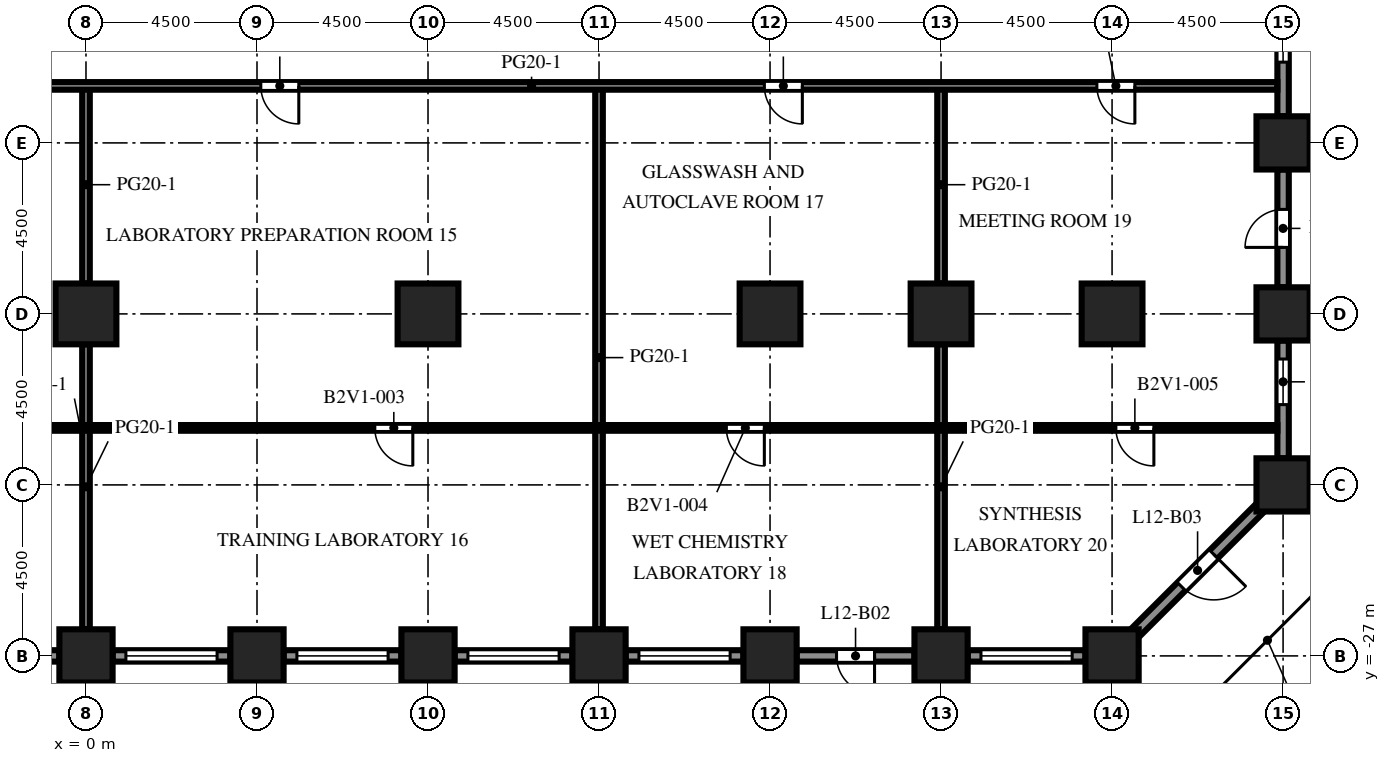
"""IFC4 building model, lengths in metres.
Left out: names, types, materials, properties, quantities, classifications, styles, units other than length and angle.
Written with IfcOpenShell. Run it as: python <this file> out.ifc"""

import sys

from ifc_helpers import new_model, si_unit, direction, frame, frame_2d, origin, origin_2d, place, context, subcontext, project, spatial, rectangle, extrude, element, fill, save


model = new_model("IFC4")
c1 = context("Model", 3, precision=1e-05, world=origin(), true_north=direction((0.0, 1.0)))
c2 = subcontext(c1, "Body", "Model", "MODEL_VIEW")
j1 = project(units=[si_unit("LENGTHUNIT", "METRE"), si_unit("PLANEANGLEUNIT", "RADIAN")], contexts=[c1])
p1 = place(None, origin())
s1 = spatial("IfcSite", under=j1, at=p1, CompositionType="ELEMENT")
p2 = place(p1, origin())
s2 = spatial("IfcBuilding", under=s1, at=p2, CompositionType="ELEMENT")
p3 = place(p2, frame((0.0, 0.0, 54.2)))
s3 = spatial("IfcBuildingStorey", under=s2, at=p3, CompositionType="ELEMENT", Elevation=54.2)
for number, where, z_axis, x_axis in (
    (1, (0.0, -27.0, 0.0), (0.0, 0.0, 1.0), (1.0, 0.0, 0.0)),
    (2, (4.5, -27.0, 0.0), (0.0, 0.0, 1.0), (1.0, 0.0, 0.0)),
    (3, (9.0, -27.0, 0.0), (0.0, 0.0, 1.0), (1.0, 0.0, 0.0)),
    (4, (13.5, -27.0, 0.0), (0.0, 0.0, 1.0), (1.0, 0.0, 0.0)),
    (5, (18.0, -27.0, 0.0), (0.0, 0.0, 1.0), (1.0, 0.0, 0.0)),
    (6, (22.5, -27.0, 0.0), (0.0, 0.0, 1.0), (1.0, 0.0, 0.0)),
    (7, (27.0, -27.0, 0.0), (0.0, 0.0, 1.0), (1.0, 0.0, 0.0)),
    (8, (31.5, -22.5, 0.0), (0.0, 0.0, 1.0), (1.0, 0.0, 0.0)),
    (9, (31.5, -18.0, 0.0), (0.0, 0.0, 1.0), (1.0, 0.0, 0.0)),
    (10, (31.5, -13.5, 0.0), (0.0, 0.0, 1.0), (1.0, 0.0, 0.0)),
):
    element("IfcColumn", number, at=place(p3, frame(where, z_axis=z_axis, x_axis=x_axis)), inside=s3, PredefinedType="COLUMN", context=c2, shape_type="SweptSolid", body=[
        extrude(rectangle(XDim=1.4, YDim=1.4, at=origin_2d()), origin(), (0.0, 0.0, 1.0), 4.1),
    ])
for number, where, z_axis, x_axis in (
    (11, (0.0, -18.0, 0.0), (0.0, 0.0, 1.0), (1.0, 0.0, 0.0)),
    (12, (9.0, -18.0, 0.0), (0.0, 0.0, 1.0), (1.0, 0.0, 0.0)),
    (13, (18.0, -18.0, 0.0), (0.0, 0.0, 1.0), (1.0, 0.0, 0.0)),
    (14, (22.5, -18.0, 0.0), (0.0, 0.0, 1.0), (1.0, 0.0, 0.0)),
    (15, (27.0, -18.0, 0.0), (0.0, 0.0, 1.0), (1.0, 0.0, 0.0)),
):
    element("IfcColumn", number, at=place(p3, frame(where, z_axis=z_axis, x_axis=x_axis)), inside=s3, PredefinedType="COLUMN", context=c2, shape_type="SweptSolid", body=[
        extrude(rectangle(XDim=1.6, YDim=1.6, at=origin_2d()), origin(), (0.0, 0.0, 1.0), 4.1),
    ])
p4 = place(p3, frame((-0.7, -27.0, 0.0), z_axis=(0.0, 0.0, 1.0), x_axis=(-1.0, 0.0, 0.0)))
e16 = element("IfcWall", 16, at=p4, inside=s3, PredefinedType="SOLIDWALL", context=c2, shape_type="SweptSolid", body=[
    extrude(rectangle(XDim=3.1, YDim=0.3, at=frame_2d((1.55, 0.0))), origin(), (0.0, 0.0, 1.0), 2.75),
])
p5 = place(p4, frame((0.35, 0.0, 0.8)))
e17 = element("IfcOpeningElement", 17, at=p5, cuts=e16, PredefinedType="OPENING", context=c2, shape_type="SweptSolid", body=[
    extrude(rectangle(XDim=2.4, YDim=1.7, at=frame_2d((1.2, 0.85))), frame((0.0, 0.16, 0.0), z_axis=(0.0, -1.0, 0.0), x_axis=(1.0, 0.0, 0.0)), (0.0, 0.0, 1.0), 0.32),
])
p6 = place(p3, frame((3.8, -27.0, 0.0), z_axis=(0.0, 0.0, 1.0), x_axis=(-1.0, 0.0, 0.0)))
e18 = element("IfcWall", 18, at=p6, inside=s3, PredefinedType="SOLIDWALL", context=c2, shape_type="SweptSolid", body=[
    extrude(rectangle(XDim=3.1, YDim=0.3, at=frame_2d((1.55, 0.0))), origin(), (0.0, 0.0, 1.0), 2.75),
])
p7 = place(p6, frame((0.35, 0.0, 0.8)))
e19 = element("IfcOpeningElement", 19, at=p7, cuts=e18, PredefinedType="OPENING", context=c2, shape_type="SweptSolid", body=[
    extrude(rectangle(XDim=2.4, YDim=1.7, at=frame_2d((1.2, 0.85))), frame((0.0, 0.16, 0.0), z_axis=(0.0, -1.0, 0.0), x_axis=(1.0, 0.0, 0.0)), (0.0, 0.0, 1.0), 0.32),
])
p8 = place(p3, frame((8.3, -27.0, 0.0), z_axis=(0.0, 0.0, 1.0), x_axis=(-1.0, 0.0, 0.0)))
e20 = element("IfcWall", 20, at=p8, inside=s3, PredefinedType="SOLIDWALL", context=c2, shape_type="SweptSolid", body=[
    extrude(rectangle(XDim=3.1, YDim=0.3, at=frame_2d((1.55, 0.0))), origin(), (0.0, 0.0, 1.0), 2.75),
])
p9 = place(p8, frame((0.35, 0.0, 0.8)))
e21 = element("IfcOpeningElement", 21, at=p9, cuts=e20, PredefinedType="OPENING", context=c2, shape_type="SweptSolid", body=[
    extrude(rectangle(XDim=2.4, YDim=1.7, at=frame_2d((1.2, 0.85))), frame((0.0, 0.16, 0.0), z_axis=(0.0, -1.0, 0.0), x_axis=(1.0, 0.0, 0.0)), (0.0, 0.0, 1.0), 0.32),
])
p10 = place(p3, frame((12.8, -27.0, 0.0), z_axis=(0.0, 0.0, 1.0), x_axis=(-1.0, 0.0, 0.0)))
e22 = element("IfcWall", 22, at=p10, inside=s3, PredefinedType="SOLIDWALL", context=c2, shape_type="SweptSolid", body=[
    extrude(rectangle(XDim=3.1, YDim=0.3, at=frame_2d((1.55, 0.0))), origin(), (0.0, 0.0, 1.0), 2.75),
])
p11 = place(p10, frame((0.35, 0.0, 0.8)))
e23 = element("IfcOpeningElement", 23, at=p11, cuts=e22, PredefinedType="OPENING", context=c2, shape_type="SweptSolid", body=[
    extrude(rectangle(XDim=2.4, YDim=1.7, at=frame_2d((1.2, 0.85))), frame((0.0, 0.16, 0.0), z_axis=(0.0, -1.0, 0.0), x_axis=(1.0, 0.0, 0.0)), (0.0, 0.0, 1.0), 0.32),
])
p12 = place(p3, frame((17.3, -27.0, 0.0), z_axis=(0.0, 0.0, 1.0), x_axis=(-1.0, 0.0, 0.0)))
e24 = element("IfcWall", 24, at=p12, inside=s3, PredefinedType="SOLIDWALL", context=c2, shape_type="SweptSolid", body=[
    extrude(rectangle(XDim=3.1, YDim=0.3, at=frame_2d((1.55, 0.0))), origin(), (0.0, 0.0, 1.0), 2.75),
])
p13 = place(p12, frame((0.35, 0.0, 0.8)))
e25 = element("IfcOpeningElement", 25, at=p13, cuts=e24, PredefinedType="OPENING", context=c2, shape_type="SweptSolid", body=[
    extrude(rectangle(XDim=2.4, YDim=1.7, at=frame_2d((1.2, 0.85))), frame((0.0, 0.16, 0.0), z_axis=(0.0, -1.0, 0.0), x_axis=(1.0, 0.0, 0.0)), (0.0, 0.0, 1.0), 0.32),
])
p14 = place(p3, frame((21.8, -27.0, 0.0), z_axis=(0.0, 0.0, 1.0), x_axis=(-1.0, 0.0, 0.0)))
e26 = element("IfcWall", 26, at=p14, inside=s3, PredefinedType="SOLIDWALL", context=c2, shape_type="SweptSolid", body=[
    extrude(rectangle(XDim=3.1, YDim=0.3, at=frame_2d((1.55, 0.0))), origin(), (0.0, 0.0, 1.0), 2.75),
])
p15 = place(p14, frame((1.05, 0.0, 0.0)))
e27 = element("IfcOpeningElement", 27, at=p15, cuts=e26, PredefinedType="OPENING", context=c2, shape_type="SweptSolid", body=[
    extrude(rectangle(XDim=1.0, YDim=2.2, at=frame_2d((0.5, 1.1))), frame((0.0, 0.16, 0.0), z_axis=(0.0, -1.0, 0.0), x_axis=(1.0, 0.0, 0.0)), (0.0, 0.0, 1.0), 0.32),
])
p16 = place(p3, frame((26.3, -27.0, 0.0), z_axis=(0.0, 0.0, 1.0), x_axis=(-1.0, 0.0, 0.0)))
e28 = element("IfcWall", 28, at=p16, inside=s3, PredefinedType="SOLIDWALL", context=c2, shape_type="SweptSolid", body=[
    extrude(rectangle(XDim=3.1, YDim=0.3, at=frame_2d((1.55, 0.0))), origin(), (0.0, 0.0, 1.0), 2.75),
])
p17 = place(p16, frame((0.35, 0.0, 0.8)))
e29 = element("IfcOpeningElement", 29, at=p17, cuts=e28, PredefinedType="OPENING", context=c2, shape_type="SweptSolid", body=[
    extrude(rectangle(XDim=2.4, YDim=1.7, at=frame_2d((1.2, 0.85))), frame((0.0, 0.16, 0.0), z_axis=(0.0, -1.0, 0.0), x_axis=(1.0, 0.0, 0.0)), (0.0, 0.0, 1.0), 0.32),
])
p18 = place(p3, frame((30.906, -23.094, 0.0), z_axis=(0.0, 0.0, 1.0), x_axis=(-0.707106781187, -0.707106781187, 0.0)))
e30 = element("IfcWall", 30, at=p18, inside=s3, PredefinedType="SOLIDWALL", context=c2, shape_type="SweptSolid", body=[
    extrude(rectangle(XDim=4.684, YDim=0.3, at=frame_2d((2.342, 0.0))), origin(), (0.0, 0.0, 1.0), 2.75),
])
p19 = place(p18, frame((1.742, 0.0, 0.0)))
e31 = element("IfcOpeningElement", 31, at=p19, cuts=e30, PredefinedType="OPENING", context=c2, shape_type="SweptSolid", body=[
    extrude(rectangle(XDim=1.2, YDim=2.2, at=frame_2d((0.6, 1.1))), frame((0.0, 0.16, 0.0), z_axis=(0.0, -1.0, 0.0), x_axis=(1.0, 0.0, 0.0)), (0.0, 0.0, 1.0), 0.32),
])
p20 = place(p3, frame((31.5, -18.7, 0.0), z_axis=(0.0, 0.0, 1.0), x_axis=(0.0, -1.0, 0.0)))
e32 = element("IfcWall", 32, at=p20, inside=s3, PredefinedType="SOLIDWALL", context=c2, shape_type="SweptSolid", body=[
    extrude(rectangle(XDim=3.1, YDim=0.3, at=frame_2d((1.55, 0.0))), origin(), (0.0, 0.0, 1.0), 2.75),
])
p21 = place(p20, frame((0.488, 0.0, 0.8)))
e33 = element("IfcOpeningElement", 33, at=p21, cuts=e32, PredefinedType="OPENING", context=c2, shape_type="SweptSolid", body=[
    extrude(rectangle(XDim=1.2, YDim=1.7, at=frame_2d((0.6, 0.85))), frame((0.0, 0.16, 0.0), z_axis=(0.0, -1.0, 0.0), x_axis=(1.0, 0.0, 0.0)), (0.0, 0.0, 1.0), 0.32),
])
p22 = place(p3, frame((31.5, -14.2, 0.0), z_axis=(0.0, 0.0, 1.0), x_axis=(0.0, -1.0, 0.0)))
e34 = element("IfcWall", 34, at=p22, inside=s3, PredefinedType="SOLIDWALL", context=c2, shape_type="SweptSolid", body=[
    extrude(rectangle(XDim=3.1, YDim=0.3, at=frame_2d((1.55, 0.0))), origin(), (0.0, 0.0, 1.0), 2.75),
])
p23 = place(p22, frame((1.05, 0.0, 0.0)))
e35 = element("IfcOpeningElement", 35, at=p23, cuts=e34, PredefinedType="OPENING", context=c2, shape_type="SweptSolid", body=[
    extrude(rectangle(XDim=1.0, YDim=2.2, at=frame_2d((0.5, 1.1))), frame((0.0, 0.16, 0.0), z_axis=(0.0, -1.0, 0.0), x_axis=(1.0, 0.0, 0.0)), (0.0, 0.0, 1.0), 0.32),
])
p24 = place(p3, frame((31.5, -9.7, 0.0), z_axis=(0.0, 0.0, 1.0), x_axis=(0.0, -1.0, 0.0)))
e36 = element("IfcWall", 36, at=p24, inside=s3, PredefinedType="SOLIDWALL", context=c2, shape_type="SweptSolid", body=[
    extrude(rectangle(XDim=3.1, YDim=0.3, at=frame_2d((1.55, 0.0))), origin(), (0.0, 0.0, 1.0), 2.75),
])
p25 = place(p24, frame((0.475, 0.0, 0.8)))
e37 = element("IfcOpeningElement", 37, at=p25, cuts=e36, PredefinedType="OPENING", context=c2, shape_type="SweptSolid", body=[
    extrude(rectangle(XDim=1.2, YDim=1.7, at=frame_2d((0.6, 0.85))), frame((0.0, 0.16, 0.0), z_axis=(0.0, -1.0, 0.0), x_axis=(1.0, 0.0, 0.0)), (0.0, 0.0, 1.0), 0.32),
])
p26 = place(p3, frame((0.0, -26.3, 0.0), z_axis=(0.0, 0.0, 1.0), x_axis=(0.0, 1.0, 0.0)))
e38 = element("IfcWall", 38, at=p26, inside=s3, PredefinedType="PARTITIONING", context=c2, shape_type="SweptSolid", body=[
    extrude(rectangle(XDim=7.5, YDim=0.2, at=frame_2d((3.75, 0.0))), origin(), (0.0, 0.0, 1.0), 3.65),
])
p27 = place(p3, frame((0.0, -17.2, 0.0), z_axis=(0.0, 0.0, 1.0), x_axis=(0.0, 1.0, 0.0)))
e39 = element("IfcWall", 39, at=p27, inside=s3, PredefinedType="PARTITIONING", context=c2, shape_type="SweptSolid", body=[
    extrude(rectangle(XDim=5.2, YDim=0.2, at=frame_2d((2.6, 0.0))), origin(), (0.0, 0.0, 1.0), 3.65),
])
p28 = place(p3, frame((13.5, -26.3, 0.0), z_axis=(0.0, 0.0, 1.0), x_axis=(0.0, 1.0, 0.0)))
e40 = element("IfcWall", 40, at=p28, inside=s3, PredefinedType="PARTITIONING", context=c2, shape_type="SweptSolid", body=[
    extrude(rectangle(XDim=14.3, YDim=0.2, at=frame_2d((7.15, 0.0))), origin(), (0.0, 0.0, 1.0), 3.65),
])
p29 = place(p3, frame((22.5, -26.3, 0.0), z_axis=(0.0, 0.0, 1.0), x_axis=(0.0, 1.0, 0.0)))
e41 = element("IfcWall", 41, at=p29, inside=s3, PredefinedType="PARTITIONING", context=c2, shape_type="SweptSolid", body=[
    extrude(rectangle(XDim=7.5, YDim=0.2, at=frame_2d((3.75, 0.0))), origin(), (0.0, 0.0, 1.0), 3.65),
])
p30 = place(p3, frame((22.5, -17.2, 0.0), z_axis=(0.0, 0.0, 1.0), x_axis=(0.0, 1.0, 0.0)))
e42 = element("IfcWall", 42, at=p30, inside=s3, PredefinedType="PARTITIONING", context=c2, shape_type="SweptSolid", body=[
    extrude(rectangle(XDim=5.2, YDim=0.2, at=frame_2d((2.6, 0.0))), origin(), (0.0, 0.0, 1.0), 3.65),
])
p31 = place(p3, frame((31.35, -21.0, 0.0), z_axis=(0.0, 0.0, 1.0), x_axis=(-1.0, 0.0, 0.0)))
e43 = element("IfcWall", 43, at=p31, inside=s3, PredefinedType="PARTITIONING", context=c2, shape_type="SweptSolid", body=[
    extrude(rectangle(XDim=53.7, YDim=0.15, at=frame_2d((26.85, 0.0))), origin(), (0.0, 0.0, 1.0), 3.65),
])
p32 = place(p31, frame((48.5, 0.0, 0.0)))
e44 = element("IfcOpeningElement", 44, at=p32, cuts=e43, PredefinedType="OPENING", context=c2, shape_type="SweptSolid", body=[
    extrude(rectangle(XDim=1.0, YDim=2.1, at=frame_2d((0.5, 1.05))), frame((0.0, 0.085, 0.0), z_axis=(0.0, -1.0, 0.0), x_axis=(1.0, 0.0, 0.0)), (0.0, 0.0, 1.0), 0.17),
])
p33 = place(p31, frame((39.25, 0.0, 0.0)))
e45 = element("IfcOpeningElement", 45, at=p33, cuts=e43, PredefinedType="OPENING", context=c2, shape_type="SweptSolid", body=[
    extrude(rectangle(XDim=1.0, YDim=2.1, at=frame_2d((0.5, 1.05))), frame((0.0, 0.085, 0.0), z_axis=(0.0, -1.0, 0.0), x_axis=(1.0, 0.0, 0.0)), (0.0, 0.0, 1.0), 0.17),
])
p34 = place(p31, frame((22.75, 0.0, 0.0)))
e46 = element("IfcOpeningElement", 46, at=p34, cuts=e43, PredefinedType="OPENING", context=c2, shape_type="SweptSolid", body=[
    extrude(rectangle(XDim=1.0, YDim=2.1, at=frame_2d((0.5, 1.05))), frame((0.0, 0.085, 0.0), z_axis=(0.0, -1.0, 0.0), x_axis=(1.0, 0.0, 0.0)), (0.0, 0.0, 1.0), 0.17),
])
p35 = place(p31, frame((13.5, 0.0, 0.0)))
e47 = element("IfcOpeningElement", 47, at=p35, cuts=e43, PredefinedType="OPENING", context=c2, shape_type="SweptSolid", body=[
    extrude(rectangle(XDim=1.0, YDim=2.1, at=frame_2d((0.5, 1.05))), frame((0.0, 0.085, 0.0), z_axis=(0.0, -1.0, 0.0), x_axis=(1.0, 0.0, 0.0)), (0.0, 0.0, 1.0), 0.17),
])
p36 = place(p31, frame((3.25, 0.0, 0.0)))
e48 = element("IfcOpeningElement", 48, at=p36, cuts=e43, PredefinedType="OPENING", context=c2, shape_type="SweptSolid", body=[
    extrude(rectangle(XDim=1.0, YDim=2.1, at=frame_2d((0.5, 1.05))), frame((0.0, 0.085, 0.0), z_axis=(0.0, -1.0, 0.0), x_axis=(1.0, 0.0, 0.0)), (0.0, 0.0, 1.0), 0.17),
])
p37 = place(p3, frame((31.35, -12.0, 0.0), z_axis=(0.0, 0.0, 1.0), x_axis=(-1.0, 0.0, 0.0)))
e49 = element("IfcWall", 49, at=p37, inside=s3, PredefinedType="PARTITIONING", context=c2, shape_type="SweptSolid", body=[
    extrude(rectangle(XDim=53.7, YDim=0.2, at=frame_2d((26.85, 0.0))), origin(), (0.0, 0.0, 1.0), 3.65),
])
p38 = place(p37, frame((48.25, 0.0, 0.0)))
e50 = element("IfcOpeningElement", 50, at=p38, cuts=e49, PredefinedType="OPENING", context=c2, shape_type="SweptSolid", body=[
    extrude(rectangle(XDim=1.0, YDim=2.1, at=frame_2d((0.5, 1.05))), frame((0.0, 0.11, 0.0), z_axis=(0.0, -1.0, 0.0), x_axis=(1.0, 0.0, 0.0)), (0.0, 0.0, 1.0), 0.22),
])
p39 = place(p37, frame((36.0, 0.0, 0.0)))
e51 = element("IfcOpeningElement", 51, at=p39, cuts=e49, PredefinedType="OPENING", context=c2, shape_type="SweptSolid", body=[
    extrude(rectangle(XDim=1.0, YDim=2.1, at=frame_2d((0.5, 1.05))), frame((0.0, 0.11, 0.0), z_axis=(0.0, -1.0, 0.0), x_axis=(1.0, 0.0, 0.0)), (0.0, 0.0, 1.0), 0.22),
])
p40 = place(p37, frame((25.75, 0.0, 0.0)))
e52 = element("IfcOpeningElement", 52, at=p40, cuts=e49, PredefinedType="OPENING", context=c2, shape_type="SweptSolid", body=[
    extrude(rectangle(XDim=1.0, YDim=2.1, at=frame_2d((0.5, 1.05))), frame((0.0, 0.11, 0.0), z_axis=(0.0, -1.0, 0.0), x_axis=(1.0, 0.0, 0.0)), (0.0, 0.0, 1.0), 0.22),
])
p41 = place(p37, frame((12.5, 0.0, 0.0)))
e53 = element("IfcOpeningElement", 53, at=p41, cuts=e49, PredefinedType="OPENING", context=c2, shape_type="SweptSolid", body=[
    extrude(rectangle(XDim=1.0, YDim=2.1, at=frame_2d((0.5, 1.05))), frame((0.0, 0.11, 0.0), z_axis=(0.0, -1.0, 0.0), x_axis=(1.0, 0.0, 0.0)), (0.0, 0.0, 1.0), 0.22),
])
p42 = place(p37, frame((3.75, 0.0, 0.0)))
e54 = element("IfcOpeningElement", 54, at=p42, cuts=e49, PredefinedType="OPENING", context=c2, shape_type="SweptSolid", body=[
    extrude(rectangle(XDim=1.0, YDim=2.1, at=frame_2d((0.5, 1.05))), frame((0.0, 0.11, 0.0), z_axis=(0.0, -1.0, 0.0), x_axis=(1.0, 0.0, 0.0)), (0.0, 0.0, 1.0), 0.22),
])
p43 = place(p7, origin())
e55 = element("IfcWindow", 55, at=p43, inside=s3, PartitioningType="SINGLE_PANEL", PredefinedType="WINDOW", context=c2, shape_type="SweptSolid", body=[
    extrude(rectangle(XDim=2.4, YDim=1.7, at=frame_2d((1.2, 0.85))), frame((0.0, 0.03, 0.0), z_axis=(0.0, -1.0, 0.0), x_axis=(1.0, 0.0, 0.0)), (0.0, 0.0, 1.0), 0.06),
])
fill(e19, e55)
p44 = place(p9, origin())
e56 = element("IfcWindow", 56, at=p44, inside=s3, PartitioningType="SINGLE_PANEL", PredefinedType="WINDOW", context=c2, shape_type="SweptSolid", body=[
    extrude(rectangle(XDim=2.4, YDim=1.7, at=frame_2d((1.2, 0.85))), frame((0.0, 0.03, 0.0), z_axis=(0.0, -1.0, 0.0), x_axis=(1.0, 0.0, 0.0)), (0.0, 0.0, 1.0), 0.06),
])
fill(e21, e56)
p45 = place(p11, origin())
e57 = element("IfcWindow", 57, at=p45, inside=s3, PartitioningType="SINGLE_PANEL", PredefinedType="WINDOW", context=c2, shape_type="SweptSolid", body=[
    extrude(rectangle(XDim=2.4, YDim=1.7, at=frame_2d((1.2, 0.85))), frame((0.0, 0.03, 0.0), z_axis=(0.0, -1.0, 0.0), x_axis=(1.0, 0.0, 0.0)), (0.0, 0.0, 1.0), 0.06),
])
fill(e23, e57)
p46 = place(p13, origin())
e58 = element("IfcWindow", 58, at=p46, inside=s3, PartitioningType="SINGLE_PANEL", PredefinedType="WINDOW", context=c2, shape_type="SweptSolid", body=[
    extrude(rectangle(XDim=2.4, YDim=1.7, at=frame_2d((1.2, 0.85))), frame((0.0, 0.03, 0.0), z_axis=(0.0, -1.0, 0.0), x_axis=(1.0, 0.0, 0.0)), (0.0, 0.0, 1.0), 0.06),
])
fill(e25, e58)
p47 = place(p15, origin())
e59 = element("IfcDoor", 59, at=p47, inside=s3, OperationType="SINGLE_SWING_LEFT", PredefinedType="DOOR", context=c2, shape_type="SweptSolid", body=[
    extrude(rectangle(XDim=1.0, YDim=2.2, at=frame_2d((0.5, 1.1))), frame((0.0, 0.025, 0.0), z_axis=(0.0, -1.0, 0.0), x_axis=(1.0, 0.0, 0.0)), (0.0, 0.0, 1.0), 0.05),
])
fill(e27, e59)
p48 = place(p17, origin())
e60 = element("IfcWindow", 60, at=p48, inside=s3, PartitioningType="SINGLE_PANEL", PredefinedType="WINDOW", context=c2, shape_type="SweptSolid", body=[
    extrude(rectangle(XDim=2.4, YDim=1.7, at=frame_2d((1.2, 0.85))), frame((0.0, 0.03, 0.0), z_axis=(0.0, -1.0, 0.0), x_axis=(1.0, 0.0, 0.0)), (0.0, 0.0, 1.0), 0.06),
])
fill(e29, e60)
p49 = place(p19, origin())
e61 = element("IfcDoor", 61, at=p49, inside=s3, OperationType="SINGLE_SWING_LEFT", PredefinedType="DOOR", context=c2, shape_type="SweptSolid", body=[
    extrude(rectangle(XDim=1.2, YDim=2.2, at=frame_2d((0.6, 1.1))), frame((0.0, 0.025, 0.0), z_axis=(0.0, -1.0, 0.0), x_axis=(1.0, 0.0, 0.0)), (0.0, 0.0, 1.0), 0.05),
])
fill(e31, e61)
p50 = place(p21, origin())
e62 = element("IfcWindow", 62, at=p50, inside=s3, PartitioningType="SINGLE_PANEL", PredefinedType="WINDOW", context=c2, shape_type="SweptSolid", body=[
    extrude(rectangle(XDim=1.2, YDim=1.7, at=frame_2d((0.6, 0.85))), frame((0.0, 0.03, 0.0), z_axis=(0.0, -1.0, 0.0), x_axis=(1.0, 0.0, 0.0)), (0.0, 0.0, 1.0), 0.06),
])
fill(e33, e62)
p51 = place(p23, origin())
e63 = element("IfcDoor", 63, at=p51, inside=s3, OperationType="SINGLE_SWING_RIGHT", PredefinedType="DOOR", context=c2, shape_type="SweptSolid", body=[
    extrude(rectangle(XDim=1.0, YDim=2.2, at=frame_2d((0.5, 1.1))), frame((0.0, 0.025, 0.0), z_axis=(0.0, -1.0, 0.0), x_axis=(1.0, 0.0, 0.0)), (0.0, 0.0, 1.0), 0.05),
])
fill(e35, e63)
p52 = place(p25, origin())
e64 = element("IfcWindow", 64, at=p52, inside=s3, PartitioningType="SINGLE_PANEL", PredefinedType="WINDOW", context=c2, shape_type="SweptSolid", body=[
    extrude(rectangle(XDim=1.2, YDim=1.7, at=frame_2d((0.6, 0.85))), frame((0.0, 0.03, 0.0), z_axis=(0.0, -1.0, 0.0), x_axis=(1.0, 0.0, 0.0)), (0.0, 0.0, 1.0), 0.06),
])
fill(e37, e64)
p53 = place(p34, origin())
e65 = element("IfcDoor", 65, at=p53, inside=s3, OperationType="SINGLE_SWING_LEFT", PredefinedType="DOOR", context=c2, shape_type="SweptSolid", body=[
    extrude(rectangle(XDim=1.0, YDim=2.1, at=frame_2d((0.5, 1.05))), frame((0.0, 0.025, 0.0), z_axis=(0.0, -1.0, 0.0), x_axis=(1.0, 0.0, 0.0)), (0.0, 0.0, 1.0), 0.05),
])
fill(e46, e65)
p54 = place(p35, origin())
e66 = element("IfcDoor", 66, at=p54, inside=s3, OperationType="SINGLE_SWING_LEFT", PredefinedType="DOOR", context=c2, shape_type="SweptSolid", body=[
    extrude(rectangle(XDim=1.0, YDim=2.1, at=frame_2d((0.5, 1.05))), frame((0.0, 0.025, 0.0), z_axis=(0.0, -1.0, 0.0), x_axis=(1.0, 0.0, 0.0)), (0.0, 0.0, 1.0), 0.05),
])
fill(e47, e66)
p55 = place(p36, origin())
e67 = element("IfcDoor", 67, at=p55, inside=s3, OperationType="SINGLE_SWING_LEFT", PredefinedType="DOOR", context=c2, shape_type="SweptSolid", body=[
    extrude(rectangle(XDim=1.0, YDim=2.1, at=frame_2d((0.5, 1.05))), frame((0.0, 0.025, 0.0), z_axis=(0.0, -1.0, 0.0), x_axis=(1.0, 0.0, 0.0)), (0.0, 0.0, 1.0), 0.05),
])
fill(e48, e67)
p56 = place(p40, origin())
e68 = element("IfcDoor", 68, at=p56, inside=s3, OperationType="SINGLE_SWING_LEFT", PredefinedType="DOOR", context=c2, shape_type="SweptSolid", body=[
    extrude(rectangle(XDim=1.0, YDim=2.1, at=frame_2d((0.5, 1.05))), frame((0.0, 0.025, 0.0), z_axis=(0.0, -1.0, 0.0), x_axis=(1.0, 0.0, 0.0)), (0.0, 0.0, 1.0), 0.05),
])
fill(e52, e68)
p57 = place(p41, origin())
e69 = element("IfcDoor", 69, at=p57, inside=s3, OperationType="SINGLE_SWING_LEFT", PredefinedType="DOOR", context=c2, shape_type="SweptSolid", body=[
    extrude(rectangle(XDim=1.0, YDim=2.1, at=frame_2d((0.5, 1.05))), frame((0.0, 0.025, 0.0), z_axis=(0.0, -1.0, 0.0), x_axis=(1.0, 0.0, 0.0)), (0.0, 0.0, 1.0), 0.05),
])
fill(e53, e69)
p58 = place(p42, origin())
e70 = element("IfcDoor", 70, at=p58, inside=s3, OperationType="SINGLE_SWING_LEFT", PredefinedType="DOOR", context=c2, shape_type="SweptSolid", body=[
    extrude(rectangle(XDim=1.0, YDim=2.1, at=frame_2d((0.5, 1.05))), frame((0.0, 0.025, 0.0), z_axis=(0.0, -1.0, 0.0), x_axis=(1.0, 0.0, 0.0)), (0.0, 0.0, 1.0), 0.05),
])
fill(e54, e70)
save(model, sys.argv[1])
